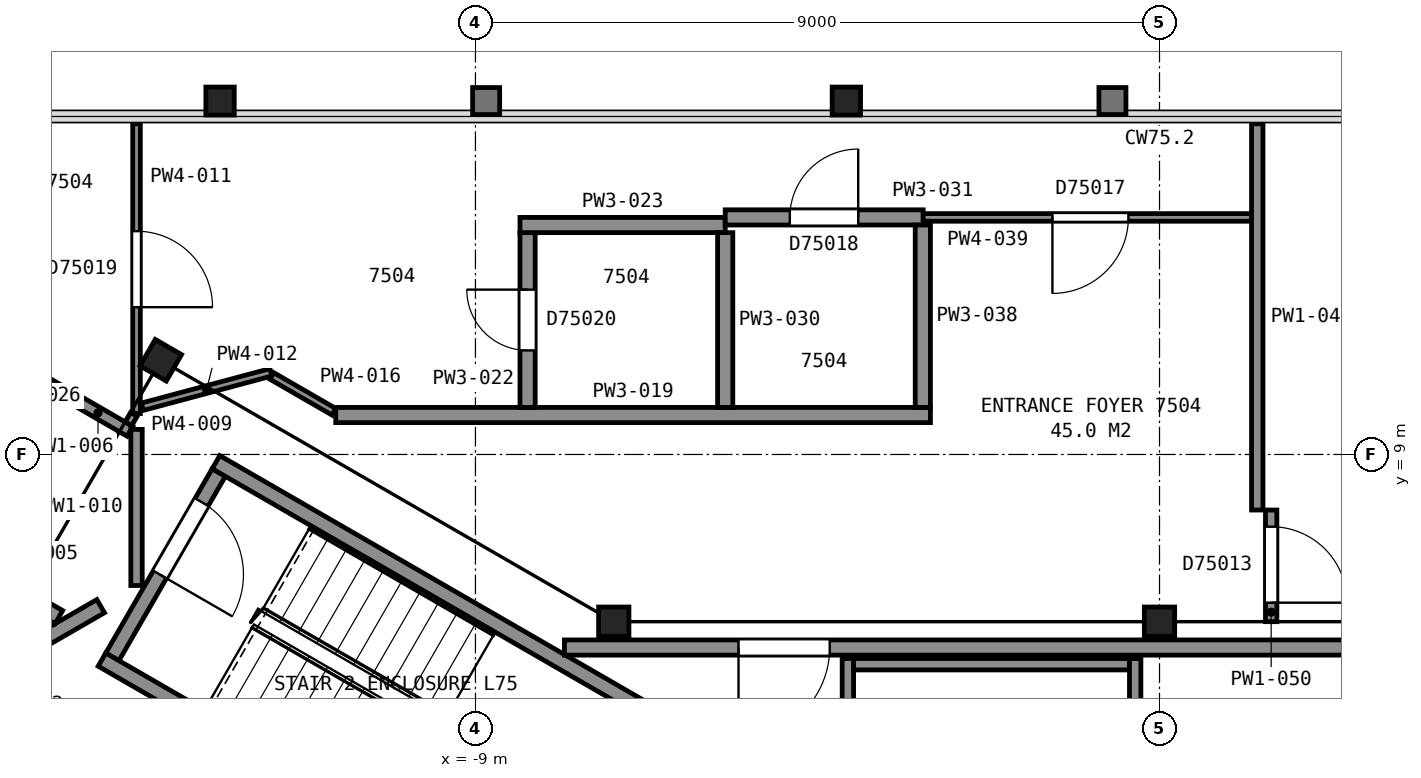
"""IFC4 building model, lengths in metres.
Left out: names, types, materials, properties, quantities, classifications, styles, units other than length and angle.
Written with IfcOpenShell. Run it as: python <this file> out.ifc"""

import sys

from ifc_helpers import new_model, si_unit, direction, frame, frame_2d, origin, origin_2d, place, context, subcontext, project, spatial, rectangle, i_section, extrude, element, fill, save


model = new_model("IFC4")
c1 = context("Model", 3, precision=1e-05, world=origin(), true_north=direction((0.0, 1.0)))
c2 = subcontext(c1, "Body", "Model", "MODEL_VIEW")
j1 = project(units=[si_unit("LENGTHUNIT", "METRE"), si_unit("PLANEANGLEUNIT", "RADIAN")], contexts=[c1])
p1 = place(None, origin())
s1 = spatial("IfcSite", under=j1, at=p1, CompositionType="ELEMENT")
p2 = place(p1, origin())
s2 = spatial("IfcBuilding", under=s1, at=p2, CompositionType="ELEMENT")
p3 = place(p2, frame((0.0, 0.0, 297.3)))
s3 = spatial("IfcBuildingStorey", under=s2, at=p3, CompositionType="ELEMENT", Elevation=297.3)
for number, where, z_axis, x_axis in (
    (1, (-4.12, 13.65, 0.0), (0.0, 0.0, 1.0), (1.0, 0.0, 0.0)),
    (2, (-12.36, 13.65, 0.0), (0.0, 0.0, 1.0), (1.0, 0.0, 0.0)),
):
    element("IfcColumn", number, at=place(p3, frame(where, z_axis=z_axis, x_axis=x_axis)), inside=s3, PredefinedType="COLUMN", context=c2, shape_type="SweptSolid", body=[
        extrude(i_section(OverallWidth=0.373, OverallDepth=0.368, WebThickness=0.015, FlangeThickness=0.024, FilletRadius=0.015, at=origin_2d()), origin(), (0.0, 0.0, 1.0), 3.7),
    ])
for number, where, z_axis, x_axis in (
    (3, (0.0, 6.8, 0.0), (0.0, 0.0, 1.0), (1.0, 0.0, 0.0)),
    (4, (-7.18, 6.8, 0.0), (0.0, 0.0, 1.0), (1.0, 0.0, 0.0)),
):
    element("IfcColumn", number, at=place(p3, frame(where, z_axis=z_axis, x_axis=x_axis)), inside=s3, PredefinedType="COLUMN", context=c2, shape_type="SweptSolid", body=[
        extrude(i_section(OverallWidth=0.399, OverallDepth=0.386, WebThickness=0.021, FlangeThickness=0.033, FilletRadius=0.015, at=origin_2d()), origin(), (0.0, 0.0, 1.0), 3.7),
    ])
p4 = place(p3, frame((-13.14, 10.24, 0.0), z_axis=(0.0, 0.0, 1.0), x_axis=(0.5, 0.866025403784, 0.0)))
e5 = element("IfcColumn", 5, at=p4, inside=s3, PredefinedType="COLUMN", context=c2, shape_type="SweptSolid", body=[
    extrude(i_section(OverallWidth=0.401, OverallDepth=0.399, WebThickness=0.025, FlangeThickness=0.04, FilletRadius=0.015, at=origin_2d()), origin(), (0.0, 0.0, 1.0), 3.7),
])
p5 = place(p3, frame((-12.377, 8.762, 0.0), z_axis=(0.0, 0.0, 1.0), x_axis=(-0.500049511043, -0.865996816683, 0.0)))
e6 = element("IfcWall", 6, at=p5, inside=s3, PredefinedType="PARTITIONING", context=c2, shape_type="SweptSolid", body=[
    extrude(rectangle(XDim=2.8, YDim=0.2, at=frame_2d((1.4, 0.0))), origin(), (0.0, 0.0, 1.0), 3.45),
])
p6 = place(p5, frame((0.45, 0.0, 0.0)))
e7 = element("IfcOpeningElement", 7, at=p6, cuts=e6, PredefinedType="OPENING", context=c2, shape_type="SweptSolid", body=[
    extrude(rectangle(XDim=1.1, YDim=2.1, at=frame_2d((0.55, 1.05))), frame((0.0, 0.11, 0.0), z_axis=(0.0, -1.0, 0.0), x_axis=(1.0, 0.0, 0.0)), (0.0, 0.0, 1.0), 0.22),
])
for number, where, z_axis, x_axis in (
    (8, (-7.678, 2.701, 0.0), (0.0, 0.0, 1.0), (-0.866, 0.5, 0.0)),
    (9, (-6.178, 5.299, 0.0), (0.0, 0.0, 1.0), (-0.866, 0.5, 0.0)),
):
    element("IfcWall", number, at=place(p3, frame(where, z_axis=z_axis, x_axis=x_axis)), inside=s3, PredefinedType="PARTITIONING", context=c2, shape_type="SweptSolid", body=[
        extrude(rectangle(XDim=7.2, YDim=0.2, at=frame_2d((3.6, 0.0))), origin(), (0.0, 0.0, 1.0), 3.45),
    ])
p7 = place(p3, frame((7.829, 6.46, 0.0), z_axis=(0.0, 0.0, 1.0), x_axis=(-1.0, 0.0, 0.0)))
e10 = element("IfcWall", 10, at=p7, inside=s3, PredefinedType="PARTITIONING", context=c2, shape_type="SweptSolid", body=[
    extrude(rectangle(XDim=15.658, YDim=0.2, at=frame_2d((7.829, 0.0))), origin(), (0.0, 0.0, 1.0), 3.45),
])
p8 = place(p7, frame((12.168, 0.0, 0.0)))
e11 = element("IfcOpeningElement", 11, at=p8, cuts=e10, PredefinedType="OPENING", context=c2, shape_type="SweptSolid", body=[
    extrude(rectangle(XDim=1.2, YDim=2.1, at=frame_2d((0.6, 1.05))), frame((0.0, 0.11, 0.0), z_axis=(0.0, -1.0, 0.0), x_axis=(1.0, 0.0, 0.0)), (0.0, 0.0, 1.0), 0.22),
])
p9 = place(p3, frame((-4.1, 2.085, 0.0), z_axis=(0.0, 0.0, 1.0), x_axis=(0.0, 1.0, 0.0)))
e12 = element("IfcWall", 12, at=p9, inside=s3, PredefinedType="PARTITIONING", context=c2, shape_type="SweptSolid", body=[
    extrude(rectangle(XDim=4.23, YDim=0.15, at=frame_2d((2.115, 0.0))), origin(), (0.0, 0.0, 1.0), 3.45),
])
p10 = place(p9, frame((1.625, 0.0, 0.0)))
e13 = element("IfcOpeningElement", 13, at=p10, cuts=e12, PredefinedType="OPENING", context=c2, shape_type="SweptSolid", body=[
    extrude(rectangle(XDim=1.0, YDim=2.1, at=frame_2d((0.5, 1.05))), frame((0.0, 0.085, 0.0), z_axis=(0.0, -1.0, 0.0), x_axis=(1.0, 0.0, 0.0)), (0.0, 0.0, 1.0), 0.17),
])
p11 = place(p3, frame((-4.025, 6.24, 0.0), z_axis=(0.0, 0.0, 1.0), x_axis=(1.0, 0.0, 0.0)))
e14 = element("IfcWall", 14, at=p11, inside=s3, PredefinedType="PARTITIONING", context=c2, shape_type="SweptSolid", body=[
    extrude(rectangle(XDim=3.63, YDim=0.15, at=frame_2d((1.815, 0.0))), origin(), (0.0, 0.0, 1.0), 3.45),
])
p12 = place(p3, frame((-0.32, 2.252, 0.0), z_axis=(0.0, 0.0, 1.0), x_axis=(0.0, 1.0, 0.0)))
e15 = element("IfcWall", 15, at=p12, inside=s3, PredefinedType="PARTITIONING", context=c2, shape_type="SweptSolid", body=[
    extrude(rectangle(XDim=4.063, YDim=0.15, at=frame_2d((2.031, 0.0))), origin(), (0.0, 0.0, 1.0), 3.45),
])
p13 = place(p3, frame((-18.078, 4.61, 0.0), z_axis=(0.0, 0.0, 1.0), x_axis=(0.86606672372, 0.499928424942, 0.0)))
e16 = element("IfcWall", 16, at=p13, inside=s3, PredefinedType="PARTITIONING", context=c2, shape_type="SweptSolid", body=[
    extrude(rectangle(XDim=4.788, YDim=0.2, at=frame_2d((2.394, 0.0))), origin(), (0.0, 0.0, 1.0), 2.723),
])
p14 = place(p13, frame((1.504, 0.0, 0.0)))
e17 = element("IfcOpeningElement", 17, at=p14, cuts=e16, PredefinedType="OPENING", context=c2, shape_type="SweptSolid", body=[
    extrude(rectangle(XDim=0.9, YDim=2.1, at=frame_2d((0.45, 1.05))), frame((0.0, 0.11, 0.0), z_axis=(0.0, -1.0, 0.0), x_axis=(1.0, 0.0, 0.0)), (0.0, 0.0, 1.0), 0.22),
])
p15 = place(p3, frame((-16.151, 7.824, 0.0), z_axis=(0.0, 0.0, 1.0), x_axis=(0.86603803935, -0.499978113919, 0.0)))
e18 = element("IfcWall", 18, at=p15, inside=s3, PredefinedType="PARTITIONING", context=c2, shape_type="SweptSolid", body=[
    extrude(rectangle(XDim=1.929, YDim=0.2, at=frame_2d((0.964, 0.0))), origin(), (0.0, 0.0, 1.0), 2.723),
])
p16 = place(p3, frame((-14.945, 10.114, 0.0), z_axis=(0.0, 0.0, 1.0), x_axis=(0.865722560266, -0.500524173887, 0.0)))
e19 = element("IfcWall", 19, at=p16, inside=s3, PredefinedType="PARTITIONING", context=c2, shape_type="SweptSolid", body=[
    extrude(rectangle(XDim=1.616, YDim=0.15, at=frame_2d((0.808, 0.0))), origin(), (0.0, 0.0, 1.0), 2.723),
])
p17 = place(p3, frame((-13.565, 9.404, 0.0), z_axis=(0.0, 0.0, 1.0), x_axis=(0.500563174455, 0.865700010615, 0.0)))
e20 = element("IfcWall", 20, at=p17, inside=s3, PredefinedType="PARTITIONING", context=c2, shape_type="SweptSolid", body=[
    extrude(rectangle(XDim=0.142, YDim=0.1, at=frame_2d((0.071, 0.0))), origin(), (0.0, 0.0, 1.0), 2.723),
])
p18 = place(p3, frame((-13.459, 7.276, 0.0), z_axis=(0.0, 0.0, 1.0), x_axis=(0.0, 1.0, 0.0)))
e21 = element("IfcWall", 21, at=p18, inside=s3, PredefinedType="PARTITIONING", context=c2, shape_type="SweptSolid", body=[
    extrude(rectangle(XDim=2.054, YDim=0.15, at=frame_2d((1.027, 0.0))), origin(), (0.0, 0.0, 1.0), 2.723),
])
p19 = place(p3, frame((-13.459, 9.538, 0.0), z_axis=(0.0, 0.0, 1.0), x_axis=(0.0, 1.0, 0.0)))
e22 = element("IfcWall", 22, at=p19, inside=s3, PredefinedType="PARTITIONING", context=c2, shape_type="SweptSolid", body=[
    extrude(rectangle(XDim=3.813, YDim=0.1, at=frame_2d((1.906, 0.0))), origin(), (0.0, 0.0, 1.0), 2.723),
])
p20 = place(p19, frame((1.4, 0.0, 0.0)))
e23 = element("IfcOpeningElement", 23, at=p20, cuts=e22, PredefinedType="OPENING", context=c2, shape_type="SweptSolid", body=[
    extrude(rectangle(XDim=1.0, YDim=2.1, at=frame_2d((0.5, 1.05))), frame((0.0, 0.06, 0.0), z_axis=(0.0, -1.0, 0.0), x_axis=(1.0, 0.0, 0.0)), (0.0, 0.0, 1.0), 0.12),
])
p21 = place(p3, frame((-13.383, 9.628, 0.0), z_axis=(0.0, 0.0, 1.0), x_axis=(0.966010217228, 0.258503888194, 0.0)))
e24 = element("IfcWall", 24, at=p21, inside=s3, PredefinedType="PARTITIONING", context=c2, shape_type="SweptSolid", body=[
    extrude(rectangle(XDim=1.752, YDim=0.1, at=frame_2d((0.876, 0.0))), origin(), (0.0, 0.0, 1.0), 2.723),
])
p22 = place(p3, frame((-11.678, 10.033, 0.0), z_axis=(0.0, 0.0, 1.0), x_axis=(0.866116627388, -0.499841962787, 0.0)))
e25 = element("IfcWall", 25, at=p22, inside=s3, PredefinedType="PARTITIONING", context=c2, shape_type="SweptSolid", body=[
    extrude(rectangle(XDim=0.943, YDim=0.1, at=frame_2d((0.472, 0.0))), origin(), (0.0, 0.0, 1.0), 2.723),
])
p23 = place(p3, frame((-10.838, 9.519, 0.0), z_axis=(0.0, 0.0, 1.0), x_axis=(1.0, 0.0, 0.0)))
e26 = element("IfcWall", 26, at=p23, inside=s3, PredefinedType="PARTITIONING", context=c2, shape_type="SweptSolid", body=[
    extrude(rectangle(XDim=7.824, YDim=0.2, at=frame_2d((3.912, 0.0))), origin(), (0.0, 0.0, 1.0), 2.723),
])
p24 = place(p3, frame((-8.314, 11.919, 0.0), z_axis=(0.0, 0.0, 1.0), x_axis=(0.0, -1.0, 0.0)))
e27 = element("IfcWall", 27, at=p24, inside=s3, PredefinedType="PARTITIONING", context=c2, shape_type="SweptSolid", body=[
    extrude(rectangle(XDim=2.3, YDim=0.2, at=frame_2d((1.15, 0.0))), origin(), (0.0, 0.0, 1.0), 2.723),
])
p25 = place(p24, frame((0.75, 0.0, 0.0)))
e28 = element("IfcOpeningElement", 28, at=p25, cuts=e27, PredefinedType="OPENING", context=c2, shape_type="SweptSolid", body=[
    extrude(rectangle(XDim=0.8, YDim=2.1, at=frame_2d((0.4, 1.05))), frame((0.0, 0.11, 0.0), z_axis=(0.0, -1.0, 0.0), x_axis=(1.0, 0.0, 0.0)), (0.0, 0.0, 1.0), 0.22),
])
p26 = place(p3, frame((-8.414, 12.019, 0.0), z_axis=(0.0, 0.0, 1.0), x_axis=(1.0, 0.0, 0.0)))
e29 = element("IfcWall", 29, at=p26, inside=s3, PredefinedType="PARTITIONING", context=c2, shape_type="SweptSolid", body=[
    extrude(rectangle(XDim=2.7, YDim=0.2, at=frame_2d((1.35, 0.0))), origin(), (0.0, 0.0, 1.0), 2.723),
])
p27 = place(p3, frame((-5.714, 9.619, 0.0), z_axis=(0.0, 0.0, 1.0), x_axis=(0.0, 1.0, 0.0)))
e30 = element("IfcWall", 30, at=p27, inside=s3, PredefinedType="PARTITIONING", context=c2, shape_type="SweptSolid", body=[
    extrude(rectangle(XDim=2.3, YDim=0.2, at=frame_2d((1.15, 0.0))), origin(), (0.0, 0.0, 1.0), 2.723),
])
p28 = place(p3, frame((-3.109, 12.119, 0.0), z_axis=(0.0, 0.0, 1.0), x_axis=(-1.0, 0.0, 0.0)))
e31 = element("IfcWall", 31, at=p28, inside=s3, PredefinedType="PARTITIONING", context=c2, shape_type="SweptSolid", body=[
    extrude(rectangle(XDim=2.605, YDim=0.2, at=frame_2d((1.303, 0.0))), origin(), (0.0, 0.0, 1.0), 2.723),
])
p29 = place(p28, frame((0.855, 0.0, 0.0)))
e32 = element("IfcOpeningElement", 32, at=p29, cuts=e31, PredefinedType="OPENING", context=c2, shape_type="SweptSolid", body=[
    extrude(rectangle(XDim=0.9, YDim=2.1, at=frame_2d((0.45, 1.05))), frame((0.0, 0.11, 0.0), z_axis=(0.0, -1.0, 0.0), x_axis=(1.0, 0.0, 0.0)), (0.0, 0.0, 1.0), 0.22),
])
p30 = place(p3, frame((-3.114, 9.619, 0.0), z_axis=(0.0, 0.0, 1.0), x_axis=(0.0, 1.0, 0.0)))
e33 = element("IfcWall", 33, at=p30, inside=s3, PredefinedType="PARTITIONING", context=c2, shape_type="SweptSolid", body=[
    extrude(rectangle(XDim=2.4, YDim=0.2, at=frame_2d((1.2, 0.0))), origin(), (0.0, 0.0, 1.0), 2.723),
])
p31 = place(p3, frame((-3.109, 12.119, 0.0), z_axis=(0.0, 0.0, 1.0), x_axis=(1.0, 0.0, 0.0)))
e34 = element("IfcWall", 34, at=p31, inside=s3, PredefinedType="PARTITIONING", context=c2, shape_type="SweptSolid", body=[
    extrude(rectangle(XDim=4.32, YDim=0.1, at=frame_2d((2.16, 0.0))), origin(), (0.0, 0.0, 1.0), 2.723),
])
p32 = place(p31, frame((1.7, 0.0, 0.0)))
e35 = element("IfcOpeningElement", 35, at=p32, cuts=e34, PredefinedType="OPENING", context=c2, shape_type="SweptSolid", body=[
    extrude(rectangle(XDim=1.0, YDim=2.1, at=frame_2d((0.5, 1.05))), frame((0.0, 0.06, 0.0), z_axis=(0.0, -1.0, 0.0), x_axis=(1.0, 0.0, 0.0)), (0.0, 0.0, 1.0), 0.12),
])
p33 = place(p3, frame((1.286, 8.269, 0.0), z_axis=(0.0, 0.0, 1.0), x_axis=(0.0, 1.0, 0.0)))
e36 = element("IfcWall", 36, at=p33, inside=s3, PredefinedType="PARTITIONING", context=c2, shape_type="SweptSolid", body=[
    extrude(rectangle(XDim=5.082, YDim=0.15, at=frame_2d((2.541, 0.0))), origin(), (0.0, 0.0, 1.0), 2.723),
])
p34 = place(p3, frame((1.469, 8.269, 0.0), z_axis=(0.0, 0.0, 1.0), x_axis=(0.0, -1.0, 0.0)))
e37 = element("IfcWall", 37, at=p34, inside=s3, PredefinedType="PARTITIONING", context=c2, shape_type="SweptSolid", body=[
    extrude(rectangle(XDim=1.469, YDim=0.15, at=frame_2d((0.734, 0.0))), origin(), (0.0, 0.0, 1.0), 2.723),
])
p35 = place(p34, frame((0.219, 0.0, 0.0)))
e38 = element("IfcOpeningElement", 38, at=p35, cuts=e37, PredefinedType="OPENING", context=c2, shape_type="SweptSolid", body=[
    extrude(rectangle(XDim=1.0, YDim=2.1, at=frame_2d((0.5, 1.05))), frame((0.0, 0.085, 0.0), z_axis=(0.0, -1.0, 0.0), x_axis=(1.0, 0.0, 0.0)), (0.0, 0.0, 1.0), 0.17),
])
p36 = place(p6, origin())
e39 = element("IfcDoor", 39, at=p36, inside=s3, OperationType="SINGLE_SWING_RIGHT", PredefinedType="DOOR", context=c2, shape_type="SweptSolid", body=[
    extrude(rectangle(XDim=1.1, YDim=2.1, at=frame_2d((0.55, 1.05))), frame((0.0, 0.025, 0.0), z_axis=(0.0, -1.0, 0.0), x_axis=(1.0, 0.0, 0.0)), (0.0, 0.0, 1.0), 0.05),
])
fill(e7, e39)
p37 = place(p8, origin())
e40 = element("IfcDoor", 40, at=p37, inside=s3, OperationType="SINGLE_SWING_RIGHT", PredefinedType="DOOR", context=c2, shape_type="SweptSolid", body=[
    extrude(rectangle(XDim=1.2, YDim=2.1, at=frame_2d((0.6, 1.05))), frame((0.0, 0.025, 0.0), z_axis=(0.0, -1.0, 0.0), x_axis=(1.0, 0.0, 0.0)), (0.0, 0.0, 1.0), 0.05),
])
fill(e11, e40)
p38 = place(p20, origin())
e41 = element("IfcDoor", 41, at=p38, inside=s3, OperationType="SINGLE_SWING_LEFT", PredefinedType="DOOR", context=c2, shape_type="SweptSolid", body=[
    extrude(rectangle(XDim=1.0, YDim=2.1, at=frame_2d((0.5, 1.05))), frame((0.0, 0.025, 0.0), z_axis=(0.0, -1.0, 0.0), x_axis=(1.0, 0.0, 0.0)), (0.0, 0.0, 1.0), 0.05),
])
fill(e23, e41)
p39 = place(p25, origin())
e42 = element("IfcDoor", 42, at=p39, inside=s3, OperationType="SINGLE_SWING_LEFT", PredefinedType="DOOR", context=c2, shape_type="SweptSolid", body=[
    extrude(rectangle(XDim=0.8, YDim=2.1, at=frame_2d((0.4, 1.05))), frame((0.0, 0.025, 0.0), z_axis=(0.0, -1.0, 0.0), x_axis=(1.0, 0.0, 0.0)), (0.0, 0.0, 1.0), 0.05),
])
fill(e28, e42)
p40 = place(p29, origin())
e43 = element("IfcDoor", 43, at=p40, inside=s3, OperationType="SINGLE_SWING_LEFT", PredefinedType="DOOR", context=c2, shape_type="SweptSolid", body=[
    extrude(rectangle(XDim=0.9, YDim=2.1, at=frame_2d((0.45, 1.05))), frame((0.0, 0.025, 0.0), z_axis=(0.0, -1.0, 0.0), x_axis=(1.0, 0.0, 0.0)), (0.0, 0.0, 1.0), 0.05),
])
fill(e32, e43)
p41 = place(p32, origin())
e44 = element("IfcDoor", 44, at=p41, inside=s3, OperationType="SINGLE_SWING_LEFT", PredefinedType="DOOR", context=c2, shape_type="SweptSolid", body=[
    extrude(rectangle(XDim=1.0, YDim=2.1, at=frame_2d((0.5, 1.05))), frame((0.0, 0.025, 0.0), z_axis=(0.0, -1.0, 0.0), x_axis=(1.0, 0.0, 0.0)), (0.0, 0.0, 1.0), 0.05),
])
fill(e35, e44)
p42 = place(p35, origin())
e45 = element("IfcDoor", 45, at=p42, inside=s3, OperationType="SINGLE_SWING_RIGHT", PredefinedType="DOOR", context=c2, shape_type="SweptSolid", body=[
    extrude(rectangle(XDim=1.0, YDim=2.1, at=frame_2d((0.5, 1.05))), frame((0.0, 0.025, 0.0), z_axis=(0.0, -1.0, 0.0), x_axis=(1.0, 0.0, 0.0)), (0.0, 0.0, 1.0), 0.05),
])
fill(e38, e45)
save(model, sys.argv[1])
